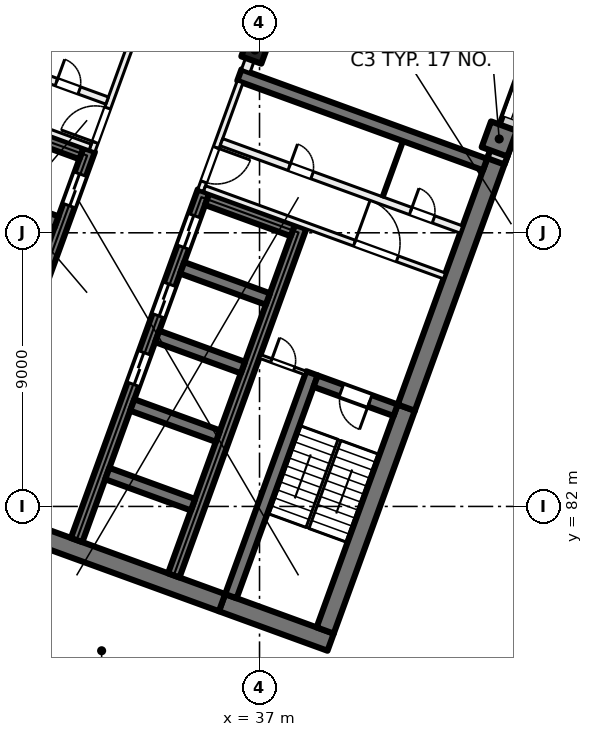
"""IFC4 building model, lengths in metres.
Left out: names, types, materials, properties, quantities, classifications, styles, units other than length and angle.
Written with IfcOpenShell. Run it as: python <this file> out.ifc"""

import sys

from ifc_helpers import new_model, si_unit, direction, frame, frame_2d, origin, origin_2d, place, context, subcontext, project, spatial, rectangle, extrude, element, fill, save


model = new_model("IFC4")
c1 = context("Model", 3, precision=1e-05, world=origin(), true_north=direction((0.0, 1.0)))
c2 = subcontext(c1, "Body", "Model", "MODEL_VIEW")
j1 = project(units=[si_unit("LENGTHUNIT", "METRE"), si_unit("PLANEANGLEUNIT", "RADIAN")], contexts=[c1])
p1 = place(None, origin())
s1 = spatial("IfcSite", under=j1, at=p1, CompositionType="ELEMENT")
p2 = place(p1, origin())
s2 = spatial("IfcBuilding", under=s1, at=p2, CompositionType="ELEMENT")
p3 = place(p2, frame((0.0, 0.0, 27.5)))
s3 = spatial("IfcBuildingStorey", under=s2, at=p3, CompositionType="ELEMENT", Elevation=27.5)
p4 = place(p3, frame((36.849, 97.011, 0.0), z_axis=(0.0, 0.0, 1.0), x_axis=(-0.342020143326, -0.939692620786, 0.0)))
e1 = element("IfcColumn", 1, at=p4, inside=s3, PredefinedType="COLUMN", context=c2, shape_type="SweptSolid", body=[
    extrude(rectangle(XDim=0.7, YDim=0.7, at=origin_2d()), origin(), (0.0, 0.0, 1.0), 4.0),
])
p5 = place(p3, frame((44.884, 94.087, 0.0), z_axis=(0.0, 0.0, 1.0), x_axis=(-0.342020143326, -0.939692620786, 0.0)))
e2 = element("IfcColumn", 2, at=p5, inside=s3, PredefinedType="COLUMN", context=c2, shape_type="SweptSolid", body=[
    extrude(rectangle(XDim=0.9, YDim=0.9, at=origin_2d()), origin(), (0.0, 0.0, 1.0), 4.0),
])
p6 = place(p3, frame((39.338, 77.535, 0.0), z_axis=(0.0, 0.0, 1.0), x_axis=(-0.939701471648, 0.341995824804, 0.0)))
e3 = element("IfcWall", 3, at=p6, inside=s3, PredefinedType="SHEAR", context=c2, shape_type="SweptSolid", body=[
    extrude(rectangle(XDim=3.8, YDim=0.6, at=frame_2d((1.9, 0.0))), origin(), (0.0, 0.0, 1.0), 4.0),
])
p7 = place(p3, frame((35.767, 78.835, 0.0), z_axis=(0.0, 0.0, 1.0), x_axis=(-0.939692894512, 0.342019391267, 0.0)))
e4 = element("IfcWall", 4, at=p7, inside=s3, PredefinedType="SHEAR", context=c2, shape_type="SweptSolid", body=[
    extrude(rectangle(XDim=14.4, YDim=0.6, at=frame_2d((7.2, 0.0))), origin(), (0.0, 0.0, 1.0), 4.0),
])
p8 = place(p3, frame((39.159, 77.92, 0.0), z_axis=(0.0, 0.0, 1.0), x_axis=(0.342016982193, 0.939693771338, 0.0)))
e5 = element("IfcWall", 5, at=p8, inside=s3, PredefinedType="SHEAR", context=c2, shape_type="SweptSolid", body=[
    extrude(rectangle(XDim=7.8, YDim=0.6, at=frame_2d((3.9, 0.0))), origin(), (0.0, 0.0, 1.0), 4.0),
])
p9 = place(p3, frame((41.827, 85.249, 0.0), z_axis=(0.0, 0.0, 1.0), x_axis=(0.342016162452, 0.939694069696, 0.0)))
e6 = element("IfcWall", 6, at=p9, inside=s3, PredefinedType="SHEAR", context=c2, shape_type="SweptSolid", body=[
    extrude(rectangle(XDim=8.9, YDim=0.6, at=frame_2d((4.45, 0.0))), origin(), (0.0, 0.0, 1.0), 4.0),
])
p10 = place(p3, frame((36.058, 79.048, 0.0), z_axis=(0.0, 0.0, 1.0), x_axis=(0.342016982193, 0.939693771338, 0.0)))
e7 = element("IfcWall", 7, at=p10, inside=s3, PredefinedType="SHEAR", context=c2, shape_type="SweptSolid", body=[
    extrude(rectangle(XDim=7.8, YDim=0.4, at=frame_2d((3.9, 0.0))), origin(), (0.0, 0.0, 1.0), 4.0),
])
p11 = place(p3, frame((41.476, 85.164, 0.0), z_axis=(0.0, 0.0, 1.0), x_axis=(-0.939678810556, 0.342058084236, 0.0)))
e8 = element("IfcWall", 8, at=p11, inside=s3, PredefinedType="SHEAR", context=c2, shape_type="SweptSolid", body=[
    extrude(rectangle(XDim=2.8, YDim=0.4, at=frame_2d((1.4, 0.0))), origin(), (0.0, 0.0, 1.0), 4.0),
])
p12 = place(p11, frame((0.9, 0.0, 0.0)))
e9 = element("IfcOpeningElement", 9, at=p12, cuts=e8, PredefinedType="OPENING", context=c2, shape_type="SweptSolid", body=[
    extrude(rectangle(XDim=1.0, YDim=2.1, at=frame_2d((0.5, 1.05))), frame((0.0, 0.21, 0.0), z_axis=(0.0, -1.0, 0.0), x_axis=(1.0, 0.0, 0.0)), (0.0, 0.0, 1.0), 0.42),
])
p13 = place(p3, frame((30.984, 80.895, 0.0), z_axis=(0.0, 0.0, 1.0), x_axis=(0.342021021735, 0.939692301071, 0.0)))
e10 = element("IfcWall", 10, at=p13, inside=s3, PredefinedType="SHEAR", context=c2, shape_type="SweptSolid", body=[
    extrude(rectangle(XDim=12.2, YDim=0.4, at=frame_2d((6.1, 0.0))), origin(), (0.0, 0.0, 1.0), 4.0),
])
p14 = place(p13, frame((5.45, 0.0, 0.0)))
e11 = element("IfcOpeningElement", 11, at=p14, cuts=e10, PredefinedType="OPENING", context=c2, shape_type="SweptSolid", body=[
    extrude(rectangle(XDim=1.1, YDim=2.1, at=frame_2d((0.55, 1.05))), frame((0.0, 0.21, 0.0), z_axis=(0.0, -1.0, 0.0), x_axis=(1.0, 0.0, 0.0)), (0.0, 0.0, 1.0), 0.42),
])
p15 = place(p13, frame((7.85, 0.0, 0.0)))
e12 = element("IfcOpeningElement", 12, at=p15, cuts=e10, PredefinedType="OPENING", context=c2, shape_type="SweptSolid", body=[
    extrude(rectangle(XDim=1.1, YDim=2.1, at=frame_2d((0.55, 1.05))), frame((0.0, 0.21, 0.0), z_axis=(0.0, -1.0, 0.0), x_axis=(1.0, 0.0, 0.0)), (0.0, 0.0, 1.0), 0.42),
])
p16 = place(p13, frame((10.25, 0.0, 0.0)))
e13 = element("IfcOpeningElement", 13, at=p16, cuts=e10, PredefinedType="OPENING", context=c2, shape_type="SweptSolid", body=[
    extrude(rectangle(XDim=1.1, YDim=2.1, at=frame_2d((0.55, 1.05))), frame((0.0, 0.21, 0.0), z_axis=(0.0, -1.0, 0.0), x_axis=(1.0, 0.0, 0.0)), (0.0, 0.0, 1.0), 0.42),
])
p17 = place(p3, frame((34.178, 79.732, 0.0), z_axis=(0.0, 0.0, 1.0), x_axis=(0.342014590177, 0.939694641948, 0.0)))
e14 = element("IfcWall", 14, at=p17, inside=s3, PredefinedType="SHEAR", context=c2, shape_type="SweptSolid", body=[
    extrude(rectangle(XDim=12.2, YDim=0.4, at=frame_2d((6.1, 0.0))), origin(), (0.0, 0.0, 1.0), 4.0),
])
for number, where, z_axis, x_axis in (
    (15, (34.812, 82.056, 0.0), (0.0, 0.0, 1.0), (-0.94, 0.342, 0.0)),
    (16, (35.632, 84.311, 0.0), (0.0, 0.0, 1.0), (-0.94, 0.342, 0.0)),
    (17, (36.453, 86.566, 0.0), (0.0, 0.0, 1.0), (-0.94, 0.342, 0.0)),
    (18, (37.274, 88.822, 0.0), (0.0, 0.0, 1.0), (-0.94, 0.342, 0.0)),
):
    element("IfcWall", number, at=place(p3, frame(where, z_axis=z_axis, x_axis=x_axis)), inside=s3, PredefinedType="SHEAR", context=c2, shape_type="SweptSolid", body=[
        extrude(rectangle(XDim=3.0, YDim=0.4, at=frame_2d((1.5, 0.0))), origin(), (0.0, 0.0, 1.0), 4.0),
    ])
p18 = place(p3, frame((38.095, 91.077, 0.0), z_axis=(0.0, 0.0, 1.0), x_axis=(-0.939676934218, 0.342063238742, 0.0)))
e19 = element("IfcWall", 19, at=p18, inside=s3, PredefinedType="SHEAR", context=c2, shape_type="SweptSolid", body=[
    extrude(rectangle(XDim=3.0, YDim=0.4, at=frame_2d((1.5, 0.0))), origin(), (0.0, 0.0, 1.0), 4.0),
])
p19 = place(p3, frame((27.225, 82.263, 0.0), z_axis=(0.0, 0.0, 1.0), x_axis=(0.342014590177, 0.939694641948, 0.0)))
e20 = element("IfcWall", 20, at=p19, inside=s3, PredefinedType="SHEAR", context=c2, shape_type="SweptSolid", body=[
    extrude(rectangle(XDim=12.2, YDim=0.4, at=frame_2d((6.1, 0.0))), origin(), (0.0, 0.0, 1.0), 4.0),
])
p20 = place(p19, frame((10.25, 0.0, 0.0)))
e21 = element("IfcOpeningElement", 21, at=p20, cuts=e20, PredefinedType="OPENING", context=c2, shape_type="SweptSolid", body=[
    extrude(rectangle(XDim=1.1, YDim=2.1, at=frame_2d((0.55, 1.05))), frame((0.0, 0.21, 0.0), z_axis=(0.0, -1.0, 0.0), x_axis=(1.0, 0.0, 0.0)), (0.0, 0.0, 1.0), 0.42),
])
p21 = place(p19, frame((0.7, 0.0, 0.0)))
e22 = element("IfcOpeningElement", 22, at=p21, cuts=e20, PredefinedType="OPENING", context=c2, shape_type="SweptSolid", body=[
    extrude(rectangle(XDim=0.8, YDim=2.1, at=frame_2d((0.4, 1.05))), frame((0.0, 0.21, 0.0), z_axis=(0.0, -1.0, 0.0), x_axis=(1.0, 0.0, 0.0)), (0.0, 0.0, 1.0), 0.42),
])
for number, where, z_axis, x_axis in (
    (23, (30.32, 91.353, 0.0), (0.0, 0.0, 1.0), (-0.94, 0.342, 0.0)),
    (24, (31.141, 93.608, 0.0), (0.0, 0.0, 1.0), (-0.94, 0.342, 0.0)),
):
    element("IfcWall", number, at=place(p3, frame(where, z_axis=z_axis, x_axis=x_axis)), inside=s3, PredefinedType="SHEAR", context=c2, shape_type="SweptSolid", body=[
        extrude(rectangle(XDim=3.0, YDim=0.4, at=frame_2d((1.5, 0.0))), origin(), (0.0, 0.0, 1.0), 4.0),
    ])
p22 = place(p3, frame((44.418, 93.245, 0.0), z_axis=(0.0, 0.0, 1.0), x_axis=(-0.93969060187, 0.342025690201, 0.0)))
e25 = element("IfcWall", 25, at=p22, inside=s3, PredefinedType="SHEAR", context=c2, shape_type="SweptSolid", body=[
    extrude(rectangle(XDim=8.6, YDim=0.4, at=frame_2d((4.3, 0.0))), origin(), (0.0, 0.0, 1.0), 4.0),
])
p23 = place(p3, frame((52.212, 113.783, 0.0), z_axis=(0.0, 0.0, 1.0), x_axis=(-0.34202521188, -0.939690775968, 0.0)))
e26 = element("IfcWall", 26, at=p23, inside=s3, PredefinedType="SOLIDWALL", context=c2, shape_type="SweptSolid", body=[
    extrude(rectangle(XDim=21.745, YDim=0.6, at=frame_2d((10.873, 0.0))), origin(), (0.0, 0.0, 1.0), 3.625),
])
p24 = place(p23, frame((4.365, 0.0, 0.0)))
e27 = element("IfcOpeningElement", 27, at=p24, cuts=e26, PredefinedType="OPENING", context=c2, shape_type="SweptSolid", body=[
    extrude(rectangle(XDim=1.8, YDim=2.4, at=frame_2d((0.9, 1.2))), frame((0.0, 0.31, 0.0), z_axis=(0.0, -1.0, 0.0), x_axis=(1.0, 0.0, 0.0)), (0.0, 0.0, 1.0), 0.62),
])
p25 = place(p23, frame((8.265, 0.0, 0.9)))
e28 = element("IfcOpeningElement", 28, at=p25, cuts=e26, PredefinedType="OPENING", context=c2, shape_type="SweptSolid", body=[
    extrude(rectangle(XDim=3.0, YDim=2.4, at=frame_2d((1.5, 1.2))), frame((0.0, 0.31, 0.0), z_axis=(0.0, -1.0, 0.0), x_axis=(1.0, 0.0, 0.0)), (0.0, 0.0, 1.0), 0.62),
])
p26 = place(p23, frame((12.765, 0.0, 0.9)))
e29 = element("IfcOpeningElement", 29, at=p26, cuts=e26, PredefinedType="OPENING", context=c2, shape_type="SweptSolid", body=[
    extrude(rectangle(XDim=3.0, YDim=2.4, at=frame_2d((1.5, 1.2))), frame((0.0, 0.31, 0.0), z_axis=(0.0, -1.0, 0.0), x_axis=(1.0, 0.0, 0.0)), (0.0, 0.0, 1.0), 0.62),
])
p27 = place(p23, frame((17.265, 0.0, 0.9)))
e30 = element("IfcOpeningElement", 30, at=p27, cuts=e26, PredefinedType="OPENING", context=c2, shape_type="SweptSolid", body=[
    extrude(rectangle(XDim=3.0, YDim=2.4, at=frame_2d((1.5, 1.2))), frame((0.0, 0.31, 0.0), z_axis=(0.0, -1.0, 0.0), x_axis=(1.0, 0.0, 0.0)), (0.0, 0.0, 1.0), 0.62),
])
p28 = place(p3, frame((31.491, 93.693, 0.0), z_axis=(0.0, 0.0, 1.0), x_axis=(0.341995824804, 0.939701471648, 0.0)))
e31 = element("IfcWall", 31, at=p28, inside=s3, PredefinedType="PARTITIONING", context=c2, shape_type="SweptSolid", body=[
    extrude(rectangle(XDim=3.8, YDim=0.2, at=frame_2d((1.9, 0.0))), origin(), (0.0, 0.0, 1.0), 3.625),
])
p29 = place(p28, frame((0.3, 0.0, 0.0)))
e32 = element("IfcOpeningElement", 32, at=p29, cuts=e31, PredefinedType="OPENING", context=c2, shape_type="SweptSolid", body=[
    extrude(rectangle(XDim=1.2, YDim=2.1, at=frame_2d((0.6, 1.05))), frame((0.0, 0.11, 0.0), z_axis=(0.0, -1.0, 0.0), x_axis=(1.0, 0.0, 0.0)), (0.0, 0.0, 1.0), 0.22),
])
p30 = place(p3, frame((23.538, 96.694, 0.0), z_axis=(0.0, 0.0, 1.0), x_axis=(0.939691552312, -0.342023078919, 0.0)))
e33 = element("IfcWall", 33, at=p30, inside=s3, PredefinedType="PARTITIONING", context=c2, shape_type="SweptSolid", body=[
    extrude(rectangle(XDim=8.4, YDim=0.2, at=frame_2d((4.2, 0.0))), origin(), (0.0, 0.0, 1.0), 3.625),
])
p31 = place(p30, frame((1.65, 0.0, 0.0)))
e34 = element("IfcOpeningElement", 34, at=p31, cuts=e33, PredefinedType="OPENING", context=c2, shape_type="SweptSolid", body=[
    extrude(rectangle(XDim=1.5, YDim=2.1, at=frame_2d((0.75, 1.05))), frame((0.0, 0.11, 0.0), z_axis=(0.0, -1.0, 0.0), x_axis=(1.0, 0.0, 0.0)), (0.0, 0.0, 1.0), 0.22),
])
p32 = place(p3, frame((24.094, 98.221, 0.0), z_axis=(0.0, 0.0, 1.0), x_axis=(0.939691552312, -0.342023078919, 0.0)))
e35 = element("IfcWall", 35, at=p32, inside=s3, PredefinedType="PARTITIONING", context=c2, shape_type="SweptSolid", body=[
    extrude(rectangle(XDim=8.4, YDim=0.25, at=frame_2d((4.2, 0.0))), origin(), (0.0, 0.0, 1.0), 3.625),
])
p33 = place(p32, frame((6.625, 0.0, 0.0)))
e36 = element("IfcOpeningElement", 36, at=p33, cuts=e35, PredefinedType="OPENING", context=c2, shape_type="SweptSolid", body=[
    extrude(rectangle(XDim=0.8, YDim=2.1, at=frame_2d((0.4, 1.05))), frame((0.0, 0.135, 0.0), z_axis=(0.0, -1.0, 0.0), x_axis=(1.0, 0.0, 0.0)), (0.0, 0.0, 1.0), 0.27),
])
p34 = place(p32, frame((2.375, 0.0, 0.0)))
e37 = element("IfcOpeningElement", 37, at=p34, cuts=e35, PredefinedType="OPENING", context=c2, shape_type="SweptSolid", body=[
    extrude(rectangle(XDim=0.8, YDim=2.1, at=frame_2d((0.4, 1.05))), frame((0.0, 0.135, 0.0), z_axis=(0.0, -1.0, 0.0), x_axis=(1.0, 0.0, 0.0)), (0.0, 0.0, 1.0), 0.27),
])
p35 = place(p3, frame((36.362, 95.964, 0.0), z_axis=(0.0, 0.0, 1.0), x_axis=(-0.341995824804, -0.939701471648, 0.0)))
e38 = element("IfcWall", 38, at=p35, inside=s3, PredefinedType="PARTITIONING", context=c2, shape_type="SweptSolid", body=[
    extrude(rectangle(XDim=3.8, YDim=0.2, at=frame_2d((1.9, 0.0))), origin(), (0.0, 0.0, 1.0), 3.625),
])
p36 = place(p35, frame((2.3, 0.0, 0.0)))
e39 = element("IfcOpeningElement", 39, at=p36, cuts=e38, PredefinedType="OPENING", context=c2, shape_type="SweptSolid", body=[
    extrude(rectangle(XDim=1.2, YDim=2.1, at=frame_2d((0.6, 1.05))), frame((0.0, 0.11, 0.0), z_axis=(0.0, -1.0, 0.0), x_axis=(1.0, 0.0, 0.0)), (0.0, 0.0, 1.0), 0.22),
])
p37 = place(p3, frame((35.19, 92.453, 0.0), z_axis=(0.0, 0.0, 1.0), x_axis=(0.939691552312, -0.342023078919, 0.0)))
e40 = element("IfcWall", 40, at=p37, inside=s3, PredefinedType="PARTITIONING", context=c2, shape_type="SweptSolid", body=[
    extrude(rectangle(XDim=8.4, YDim=0.2, at=frame_2d((4.2, 0.0))), origin(), (0.0, 0.0, 1.0), 3.625),
])
p38 = place(p37, frame((5.25, 0.0, 0.0)))
e41 = element("IfcOpeningElement", 41, at=p38, cuts=e40, PredefinedType="OPENING", context=c2, shape_type="SweptSolid", body=[
    extrude(rectangle(XDim=1.5, YDim=2.1, at=frame_2d((0.75, 1.05))), frame((0.0, 0.11, 0.0), z_axis=(0.0, -1.0, 0.0), x_axis=(1.0, 0.0, 0.0)), (0.0, 0.0, 1.0), 0.22),
])
p39 = place(p3, frame((35.746, 93.98, 0.0), z_axis=(0.0, 0.0, 1.0), x_axis=(0.939691552312, -0.342023078919, 0.0)))
e42 = element("IfcWall", 42, at=p39, inside=s3, PredefinedType="PARTITIONING", context=c2, shape_type="SweptSolid", body=[
    extrude(rectangle(XDim=8.4, YDim=0.25, at=frame_2d((4.2, 0.0))), origin(), (0.0, 0.0, 1.0), 3.625),
])
p40 = place(p39, frame((2.375, 0.0, 0.0)))
e43 = element("IfcOpeningElement", 43, at=p40, cuts=e42, PredefinedType="OPENING", context=c2, shape_type="SweptSolid", body=[
    extrude(rectangle(XDim=0.8, YDim=2.1, at=frame_2d((0.4, 1.05))), frame((0.0, 0.135, 0.0), z_axis=(0.0, -1.0, 0.0), x_axis=(1.0, 0.0, 0.0)), (0.0, 0.0, 1.0), 0.27),
])
p41 = place(p39, frame((6.625, 0.0, 0.0)))
e44 = element("IfcOpeningElement", 44, at=p41, cuts=e42, PredefinedType="OPENING", context=c2, shape_type="SweptSolid", body=[
    extrude(rectangle(XDim=0.8, YDim=2.1, at=frame_2d((0.4, 1.05))), frame((0.0, 0.135, 0.0), z_axis=(0.0, -1.0, 0.0), x_axis=(1.0, 0.0, 0.0)), (0.0, 0.0, 1.0), 0.27),
])
p42 = place(p3, frame((37.013, 86.935, 0.0), z_axis=(0.0, 0.0, 1.0), x_axis=(0.939659694648, -0.342110593602, 0.0)))
e45 = element("IfcWall", 45, at=p42, inside=s3, PredefinedType="PARTITIONING", context=c2, shape_type="SweptSolid", body=[
    extrude(rectangle(XDim=1.6, YDim=0.125, at=frame_2d((0.8, 0.0))), origin(), (0.0, 0.0, 1.0), 3.625),
])
p43 = place(p42, frame((0.4, 0.0, 0.0)))
e46 = element("IfcOpeningElement", 46, at=p43, cuts=e45, PredefinedType="OPENING", context=c2, shape_type="SweptSolid", body=[
    extrude(rectangle(XDim=0.8, YDim=2.1, at=frame_2d((0.4, 1.05))), frame((0.0, 0.073, 0.0), z_axis=(0.0, -1.0, 0.0), x_axis=(1.0, 0.0, 0.0)), (0.0, 0.0, 1.0), 0.145),
])
p44 = place(p3, frame((41.718, 94.015, 0.0), z_axis=(0.0, 0.0, 1.0), x_axis=(-0.342064742067, -0.939676386973, 0.0)))
e47 = element("IfcWall", 47, at=p44, inside=s3, PredefinedType="PARTITIONING", context=c2, shape_type="SweptSolid", body=[
    extrude(rectangle(XDim=1.95, YDim=0.1, at=frame_2d((0.975, 0.0))), origin(), (0.0, 0.0, 1.0), 3.625),
])
p45 = place(p3, frame((47.314, 125.909, 0.0), z_axis=(0.0, 0.0, 1.0), x_axis=(-0.342010770371, -0.939696032209, 0.0)))
e48 = element("IfcWall", 48, at=p45, inside=s3, PredefinedType="PARTITIONING", context=c2, shape_type="SweptSolid", body=[
    extrude(rectangle(XDim=31.485, YDim=0.3, at=frame_2d((15.742, 0.0))), origin(), (0.0, 0.0, 1.0), 3.625),
])
p46 = place(p45, frame((28.359, 0.0, 0.0)))
e49 = element("IfcOpeningElement", 49, at=p46, cuts=e48, PredefinedType="OPENING", context=c2, shape_type="SweptSolid", body=[
    extrude(rectangle(XDim=1.0, YDim=2.1, at=frame_2d((0.5, 1.05))), frame((0.0, 0.16, 0.0), z_axis=(0.0, -1.0, 0.0), x_axis=(1.0, 0.0, 0.0)), (0.0, 0.0, 1.0), 0.32),
])
p47 = place(p45, frame((23.484, 0.0, 0.0)))
e50 = element("IfcOpeningElement", 50, at=p47, cuts=e48, PredefinedType="OPENING", context=c2, shape_type="SweptSolid", body=[
    extrude(rectangle(XDim=1.0, YDim=2.1, at=frame_2d((0.5, 1.05))), frame((0.0, 0.16, 0.0), z_axis=(0.0, -1.0, 0.0), x_axis=(1.0, 0.0, 0.0)), (0.0, 0.0, 1.0), 0.32),
])
p48 = place(p45, frame((13.834, 0.0, 0.0)))
e51 = element("IfcOpeningElement", 51, at=p48, cuts=e48, PredefinedType="OPENING", context=c2, shape_type="SweptSolid", body=[
    extrude(rectangle(XDim=1.8, YDim=2.1, at=frame_2d((0.9, 1.05))), frame((0.0, 0.16, 0.0), z_axis=(0.0, -1.0, 0.0), x_axis=(1.0, 0.0, 0.0)), (0.0, 0.0, 1.0), 0.32),
])
p49 = place(p27, origin())
e52 = element("IfcWindow", 52, at=p49, inside=s3, PartitioningType="SINGLE_PANEL", PredefinedType="WINDOW", context=c2, shape_type="SweptSolid", body=[
    extrude(rectangle(XDim=3.0, YDim=2.4, at=frame_2d((1.5, 1.2))), frame((0.0, 0.03, 0.0), z_axis=(0.0, -1.0, 0.0), x_axis=(1.0, 0.0, 0.0)), (0.0, 0.0, 1.0), 0.06),
])
fill(e30, e52)
p50 = place(p20, origin())
e53 = element("IfcDoor", 53, at=p50, inside=s3, OperationType="DOUBLE_DOOR_SLIDING", PredefinedType="DOOR", context=c2, shape_type="SweptSolid", body=[
    extrude(rectangle(XDim=1.1, YDim=2.1, at=frame_2d((0.55, 1.05))), frame((0.0, 0.025, 0.0), z_axis=(0.0, -1.0, 0.0), x_axis=(1.0, 0.0, 0.0)), (0.0, 0.0, 1.0), 0.05),
])
fill(e21, e53)
p51 = place(p14, origin())
e54 = element("IfcDoor", 54, at=p51, inside=s3, OperationType="DOUBLE_DOOR_SLIDING", PredefinedType="DOOR", context=c2, shape_type="SweptSolid", body=[
    extrude(rectangle(XDim=1.1, YDim=2.1, at=frame_2d((0.55, 1.05))), frame((0.0, 0.025, 0.0), z_axis=(0.0, -1.0, 0.0), x_axis=(1.0, 0.0, 0.0)), (0.0, 0.0, 1.0), 0.05),
])
fill(e11, e54)
p52 = place(p15, origin())
e55 = element("IfcDoor", 55, at=p52, inside=s3, OperationType="DOUBLE_DOOR_SLIDING", PredefinedType="DOOR", context=c2, shape_type="SweptSolid", body=[
    extrude(rectangle(XDim=1.1, YDim=2.1, at=frame_2d((0.55, 1.05))), frame((0.0, 0.025, 0.0), z_axis=(0.0, -1.0, 0.0), x_axis=(1.0, 0.0, 0.0)), (0.0, 0.0, 1.0), 0.05),
])
fill(e12, e55)
p53 = place(p16, origin())
e56 = element("IfcDoor", 56, at=p53, inside=s3, OperationType="DOUBLE_DOOR_SLIDING", PredefinedType="DOOR", context=c2, shape_type="SweptSolid", body=[
    extrude(rectangle(XDim=1.1, YDim=2.1, at=frame_2d((0.55, 1.05))), frame((0.0, 0.025, 0.0), z_axis=(0.0, -1.0, 0.0), x_axis=(1.0, 0.0, 0.0)), (0.0, 0.0, 1.0), 0.05),
])
fill(e13, e56)
p54 = place(p29, origin())
e57 = element("IfcDoor", 57, at=p54, inside=s3, OperationType="DOUBLE_DOOR_SINGLE_SWING", PredefinedType="DOOR", context=c2, shape_type="SweptSolid", body=[
    extrude(rectangle(XDim=1.2, YDim=2.1, at=frame_2d((0.6, 1.05))), frame((0.0, 0.025, 0.0), z_axis=(0.0, -1.0, 0.0), x_axis=(1.0, 0.0, 0.0)), (0.0, 0.0, 1.0), 0.05),
])
fill(e32, e57)
p55 = place(p33, origin())
e58 = element("IfcDoor", 58, at=p55, inside=s3, OperationType="SINGLE_SWING_LEFT", PredefinedType="DOOR", context=c2, shape_type="SweptSolid", body=[
    extrude(rectangle(XDim=0.8, YDim=2.1, at=frame_2d((0.4, 1.05))), frame((0.0, 0.025, 0.0), z_axis=(0.0, -1.0, 0.0), x_axis=(1.0, 0.0, 0.0)), (0.0, 0.0, 1.0), 0.05),
])
fill(e36, e58)
p56 = place(p36, origin())
e59 = element("IfcDoor", 59, at=p56, inside=s3, OperationType="DOUBLE_DOOR_SINGLE_SWING", PredefinedType="DOOR", context=c2, shape_type="SweptSolid", body=[
    extrude(rectangle(XDim=1.2, YDim=2.1, at=frame_2d((0.6, 1.05))), frame((0.0, 0.025, 0.0), z_axis=(0.0, -1.0, 0.0), x_axis=(1.0, 0.0, 0.0)), (0.0, 0.0, 1.0), 0.05),
])
fill(e39, e59)
p57 = place(p38, origin())
e60 = element("IfcDoor", 60, at=p57, inside=s3, OperationType="DOUBLE_DOOR_SINGLE_SWING", PredefinedType="DOOR", context=c2, shape_type="SweptSolid", body=[
    extrude(rectangle(XDim=1.5, YDim=2.1, at=frame_2d((0.75, 1.05))), frame((0.0, 0.025, 0.0), z_axis=(0.0, -1.0, 0.0), x_axis=(1.0, 0.0, 0.0)), (0.0, 0.0, 1.0), 0.05),
])
fill(e41, e60)
p58 = place(p12, origin())
e61 = element("IfcDoor", 61, at=p58, inside=s3, OperationType="SINGLE_SWING_RIGHT", PredefinedType="DOOR", context=c2, shape_type="SweptSolid", body=[
    extrude(rectangle(XDim=1.0, YDim=2.1, at=frame_2d((0.5, 1.05))), frame((0.0, 0.025, 0.0), z_axis=(0.0, -1.0, 0.0), x_axis=(1.0, 0.0, 0.0)), (0.0, 0.0, 1.0), 0.05),
])
fill(e9, e61)
p59 = place(p43, origin())
e62 = element("IfcDoor", 62, at=p59, inside=s3, OperationType="SINGLE_SWING_LEFT", PredefinedType="DOOR", context=c2, shape_type="SweptSolid", body=[
    extrude(rectangle(XDim=0.8, YDim=2.1, at=frame_2d((0.4, 1.05))), frame((0.0, 0.025, 0.0), z_axis=(0.0, -1.0, 0.0), x_axis=(1.0, 0.0, 0.0)), (0.0, 0.0, 1.0), 0.05),
])
fill(e46, e62)
p60 = place(p40, origin())
e63 = element("IfcDoor", 63, at=p60, inside=s3, OperationType="SINGLE_SWING_RIGHT", PredefinedType="DOOR", context=c2, shape_type="SweptSolid", body=[
    extrude(rectangle(XDim=0.8, YDim=2.1, at=frame_2d((0.4, 1.05))), frame((0.0, 0.025, 0.0), z_axis=(0.0, -1.0, 0.0), x_axis=(1.0, 0.0, 0.0)), (0.0, 0.0, 1.0), 0.05),
])
fill(e43, e63)
p61 = place(p41, origin())
e64 = element("IfcDoor", 64, at=p61, inside=s3, OperationType="SINGLE_SWING_LEFT", PredefinedType="DOOR", context=c2, shape_type="SweptSolid", body=[
    extrude(rectangle(XDim=0.8, YDim=2.1, at=frame_2d((0.4, 1.05))), frame((0.0, 0.025, 0.0), z_axis=(0.0, -1.0, 0.0), x_axis=(1.0, 0.0, 0.0)), (0.0, 0.0, 1.0), 0.05),
])
fill(e44, e64)
save(model, sys.argv[1])
